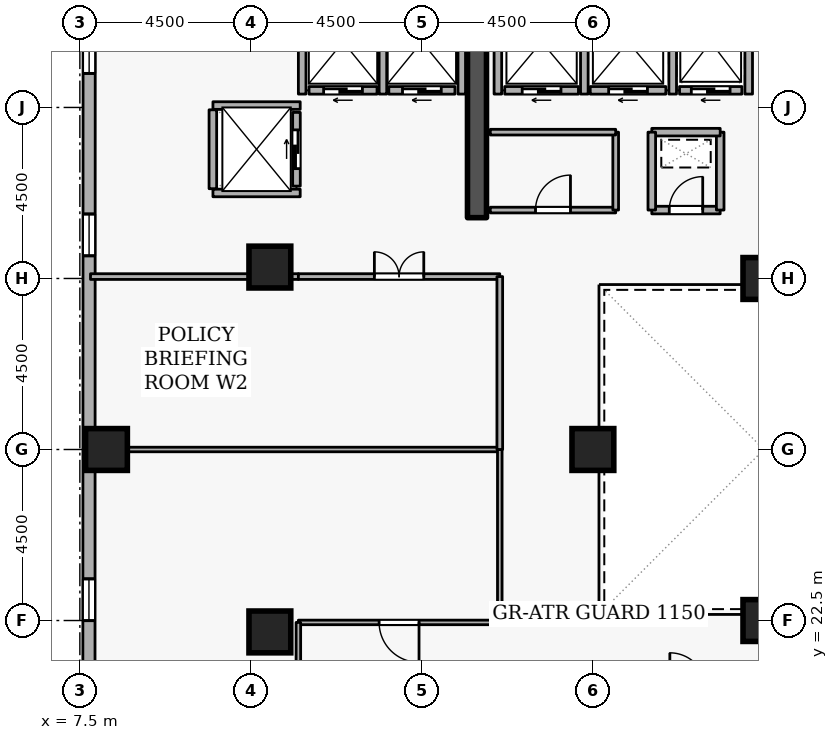
"""IFC4 building model, lengths in metres.
Left out: names, types, materials, properties, quantities, classifications, styles, units other than length and angle.
Written with IfcOpenShell. Run it as: python <this file> out.ifc"""

import sys

from ifc_helpers import new_model, si_unit, direction, frame, frame_2d, origin, origin_2d, place, context, subcontext, project, spatial, rectangle, extrude, element, fill, save


model = new_model("IFC4")
c1 = context("Model", 3, precision=1e-05, world=origin(), true_north=direction((0.0, 1.0)))
c2 = subcontext(c1, "Body", "Model", "MODEL_VIEW")
j1 = project(units=[si_unit("LENGTHUNIT", "METRE"), si_unit("PLANEANGLEUNIT", "RADIAN")], contexts=[c1])
p1 = place(None, origin())
s1 = spatial("IfcSite", under=j1, at=p1, CompositionType="ELEMENT")
p2 = place(p1, origin())
s2 = spatial("IfcBuilding", under=s1, at=p2, CompositionType="ELEMENT")
p3 = place(p2, frame((0.0, 0.0, 174.3)))
s3 = spatial("IfcBuildingStorey", under=s2, at=p3, CompositionType="ELEMENT", Elevation=174.3)
p4 = place(p3, frame((17.95, 33.1, 0.0), z_axis=(0.0, 0.0, 1.0), x_axis=(0.0, 1.0, 0.0)))
e1 = element("IfcWall", 1, at=p4, inside=s3, PredefinedType="SHEAR", context=c2, shape_type="SweptSolid", body=[
    extrude(rectangle(XDim=5.8, YDim=0.5, at=frame_2d((2.9, 0.0))), origin(), (0.0, 0.0, 1.0), 4.2),
])
for number, where, z_axis, x_axis in (
    (2, (8.2, 27.0, 0.0), (0.0, 0.0, 1.0), (1.0, 0.0, 0.0)),
    (3, (12.5, 22.2, 0.0), (0.0, 0.0, 1.0), (1.0, 0.0, 0.0)),
    (4, (12.5, 31.8, 0.0), (0.0, 0.0, 1.0), (1.0, 0.0, 0.0)),
    (5, (25.5, 22.5, 0.0), (0.0, 0.0, 1.0), (1.0, 0.0, 0.0)),
    (6, (25.5, 31.5, 0.0), (0.0, 0.0, 1.0), (1.0, 0.0, 0.0)),
    (7, (21.0, 27.0, 0.0), (0.0, 0.0, 1.0), (1.0, 0.0, 0.0)),
):
    element("IfcColumn", number, at=place(p3, frame(where, z_axis=z_axis, x_axis=x_axis)), inside=s3, PredefinedType="COLUMN", context=c2, shape_type="SweptSolid", body=[
        extrude(rectangle(XDim=1.1, YDim=1.1, at=origin_2d()), origin(), (0.0, 0.0, 1.0), 4.2),
    ])
p5 = place(p3, frame((7.747, 44.596, 0.0), z_axis=(0.0, 0.0, 1.0), x_axis=(-0.000364968916, -0.999999933399, 0.0)))
e8 = element("IfcWall", 8, at=p5, inside=s3, PredefinedType="STANDARD", context=c2, shape_type="SweptSolid", body=[
    extrude(rectangle(XDim=32.778, YDim=0.32, at=frame_2d((16.389, 0.0))), origin(), (0.0, 0.0, 1.0), 3.3),
])
p6 = place(p5, frame((1.8, 0.0, 0.72)))
e9 = element("IfcOpeningElement", 9, at=p6, cuts=e8, PredefinedType="OPENING", context=c2, shape_type="SweptSolid", body=[
    extrude(rectangle(XDim=1.1, YDim=1.8, at=frame_2d((0.55, 0.9))), frame((0.0, 0.17, 0.0), z_axis=(0.0, -1.0, 0.0), x_axis=(1.0, 0.0, 0.0)), (0.0, 0.0, 1.0), 0.34),
])
p7 = place(p5, frame((6.6, 0.0, 0.72)))
e10 = element("IfcOpeningElement", 10, at=p7, cuts=e8, PredefinedType="OPENING", context=c2, shape_type="SweptSolid", body=[
    extrude(rectangle(XDim=1.1, YDim=1.8, at=frame_2d((0.55, 0.9))), frame((0.0, 0.17, 0.0), z_axis=(0.0, -1.0, 0.0), x_axis=(1.0, 0.0, 0.0)), (0.0, 0.0, 1.0), 0.34),
])
p8 = place(p5, frame((11.4, 0.0, 0.72)))
e11 = element("IfcOpeningElement", 11, at=p8, cuts=e8, PredefinedType="OPENING", context=c2, shape_type="SweptSolid", body=[
    extrude(rectangle(XDim=1.1, YDim=1.8, at=frame_2d((0.55, 0.9))), frame((0.0, 0.17, 0.0), z_axis=(0.0, -1.0, 0.0), x_axis=(1.0, 0.0, 0.0)), (0.0, 0.0, 1.0), 0.34),
])
p9 = place(p5, frame((21.0, 0.0, 0.72)))
e12 = element("IfcOpeningElement", 12, at=p9, cuts=e8, PredefinedType="OPENING", context=c2, shape_type="SweptSolid", body=[
    extrude(rectangle(XDim=1.1, YDim=1.8, at=frame_2d((0.55, 0.9))), frame((0.0, 0.17, 0.0), z_axis=(0.0, -1.0, 0.0), x_axis=(1.0, 0.0, 0.0)), (0.0, 0.0, 1.0), 0.34),
])
p10 = place(p5, frame((25.8, 0.0, 0.72)))
e13 = element("IfcOpeningElement", 13, at=p10, cuts=e8, PredefinedType="OPENING", context=c2, shape_type="SweptSolid", body=[
    extrude(rectangle(XDim=1.1, YDim=1.8, at=frame_2d((0.55, 0.9))), frame((0.0, 0.17, 0.0), z_axis=(0.0, -1.0, 0.0), x_axis=(1.0, 0.0, 0.0)), (0.0, 0.0, 1.0), 0.34),
])
p11 = place(p3, frame((24.92, 36.45, 0.0), z_axis=(0.0, 0.0, 1.0), x_axis=(-1.0, 0.0, 0.0)))
e14 = element("IfcWall", 14, at=p11, inside=s3, PredefinedType="STANDARD", context=c2, shape_type="SweptSolid", body=[
    extrude(rectangle(XDim=1.64, YDim=0.2, at=frame_2d((0.82, 0.0))), origin(), (0.0, 0.0, 1.0), 3.94),
])
p12 = place(p11, frame((0.31, 0.0, 0.0)))
e15 = element("IfcOpeningElement", 15, at=p12, cuts=e14, PredefinedType="OPENING", context=c2, shape_type="SweptSolid", body=[
    extrude(rectangle(XDim=1.02, YDim=2.06, at=frame_2d((0.51, 1.03))), frame((0.0, 0.11, 0.0), z_axis=(0.0, -1.0, 0.0), x_axis=(1.0, 0.0, 0.0)), (0.0, 0.0, 1.0), 0.22),
])
p13 = place(p3, frame((22.92, 36.45, 0.0), z_axis=(0.0, 0.0, 1.0), x_axis=(-1.0, 0.0, 0.0)))
e16 = element("IfcWall", 16, at=p13, inside=s3, PredefinedType="STANDARD", context=c2, shape_type="SweptSolid", body=[
    extrude(rectangle(XDim=1.99, YDim=0.2, at=frame_2d((0.995, 0.0))), origin(), (0.0, 0.0, 1.0), 3.94),
])
p14 = place(p13, frame((0.485, 0.0, 0.0)))
e17 = element("IfcOpeningElement", 17, at=p14, cuts=e16, PredefinedType="OPENING", context=c2, shape_type="SweptSolid", body=[
    extrude(rectangle(XDim=1.02, YDim=2.06, at=frame_2d((0.51, 1.03))), frame((0.0, 0.11, 0.0), z_axis=(0.0, -1.0, 0.0), x_axis=(1.0, 0.0, 0.0)), (0.0, 0.0, 1.0), 0.22),
])
p15 = place(p3, frame((20.62, 36.45, 0.0), z_axis=(0.0, 0.0, 1.0), x_axis=(-1.0, 0.0, 0.0)))
e18 = element("IfcWall", 18, at=p15, inside=s3, PredefinedType="STANDARD", context=c2, shape_type="SweptSolid", body=[
    extrude(rectangle(XDim=1.94, YDim=0.2, at=frame_2d((0.97, 0.0))), origin(), (0.0, 0.0, 1.0), 3.94),
])
p16 = place(p15, frame((0.46, 0.0, 0.0)))
e19 = element("IfcOpeningElement", 19, at=p16, cuts=e18, PredefinedType="OPENING", context=c2, shape_type="SweptSolid", body=[
    extrude(rectangle(XDim=1.02, YDim=2.06, at=frame_2d((0.51, 1.03))), frame((0.0, 0.11, 0.0), z_axis=(0.0, -1.0, 0.0), x_axis=(1.0, 0.0, 0.0)), (0.0, 0.0, 1.0), 0.22),
])
p17 = place(p3, frame((17.37, 36.45, 0.0), z_axis=(0.0, 0.0, 1.0), x_axis=(-1.0, 0.0, 0.0)))
e20 = element("IfcWall", 20, at=p17, inside=s3, PredefinedType="STANDARD", context=c2, shape_type="SweptSolid", body=[
    extrude(rectangle(XDim=1.74, YDim=0.2, at=frame_2d((0.87, 0.0))), origin(), (0.0, 0.0, 1.0), 3.94),
])
p18 = place(p17, frame((0.36, 0.0, 0.0)))
e21 = element("IfcOpeningElement", 21, at=p18, cuts=e20, PredefinedType="OPENING", context=c2, shape_type="SweptSolid", body=[
    extrude(rectangle(XDim=1.02, YDim=2.06, at=frame_2d((0.51, 1.03))), frame((0.0, 0.11, 0.0), z_axis=(0.0, -1.0, 0.0), x_axis=(1.0, 0.0, 0.0)), (0.0, 0.0, 1.0), 0.22),
])
p19 = place(p3, frame((15.32, 36.45, 0.0), z_axis=(0.0, 0.0, 1.0), x_axis=(-1.0, 0.0, 0.0)))
e22 = element("IfcWall", 22, at=p19, inside=s3, PredefinedType="STANDARD", context=c2, shape_type="SweptSolid", body=[
    extrude(rectangle(XDim=1.79, YDim=0.2, at=frame_2d((0.895, 0.0))), origin(), (0.0, 0.0, 1.0), 3.94),
])
p20 = place(p19, frame((0.385, 0.0, 0.0)))
e23 = element("IfcOpeningElement", 23, at=p20, cuts=e22, PredefinedType="OPENING", context=c2, shape_type="SweptSolid", body=[
    extrude(rectangle(XDim=1.02, YDim=2.06, at=frame_2d((0.51, 1.03))), frame((0.0, 0.11, 0.0), z_axis=(0.0, -1.0, 0.0), x_axis=(1.0, 0.0, 0.0)), (0.0, 0.0, 1.0), 0.22),
])
p21 = place(p3, frame((13.2, 33.93, 0.0), z_axis=(0.0, 0.0, 1.0), x_axis=(0.0, 1.0, 0.0)))
e24 = element("IfcWall", 24, at=p21, inside=s3, PredefinedType="STANDARD", context=c2, shape_type="SweptSolid", body=[
    extrude(rectangle(XDim=1.94, YDim=0.2, at=frame_2d((0.97, 0.0))), origin(), (0.0, 0.0, 1.0), 3.94),
])
p22 = place(p21, frame((0.46, 0.0, 0.0)))
e25 = element("IfcOpeningElement", 25, at=p22, cuts=e24, PredefinedType="OPENING", context=c2, shape_type="SweptSolid", body=[
    extrude(rectangle(XDim=1.02, YDim=2.06, at=frame_2d((0.51, 1.03))), frame((0.0, 0.11, 0.0), z_axis=(0.0, -1.0, 0.0), x_axis=(1.0, 0.0, 0.0)), (0.0, 0.0, 1.0), 0.22),
])
for number, where, z_axis, x_axis in (
    (26, (25.1, 36.352, 0.0), (0.0, 0.0, 1.0), (0.0, 1.0, 0.0)),
    (27, (23.1, 36.352, 0.0), (0.0, 0.0, 1.0), (0.0, 1.0, 0.0)),
    (28, (20.775, 36.352, 0.0), (0.0, 0.0, 1.0), (0.0, 1.0, 0.0)),
    (29, (18.5, 36.352, 0.0), (0.0, 0.0, 1.0), (0.0, 1.0, 0.0)),
):
    element("IfcWall", number, at=place(p3, frame(where, z_axis=z_axis, x_axis=x_axis)), inside=s3, PredefinedType="STANDARD", context=c2, shape_type="SweptSolid", body=[
        extrude(rectangle(XDim=2.536, YDim=0.2, at=frame_2d((1.268, 0.0))), origin(), (0.0, 0.0, 1.0), 3.94),
    ])
p23 = place(p3, frame((17.55, 36.352, 0.0), z_axis=(0.0, 0.0, 1.0), x_axis=(0.0, 1.0, 0.0)))
e30 = element("IfcWall", 30, at=p23, inside=s3, PredefinedType="STANDARD", context=c2, shape_type="SweptSolid", body=[
    extrude(rectangle(XDim=2.636, YDim=0.2, at=frame_2d((1.318, 0.0))), origin(), (0.0, 0.0, 1.0), 3.145),
])
for number, where, z_axis, x_axis in (
    (31, (15.475, 36.352, 0.0), (0.0, 0.0, 1.0), (0.0, 1.0, 0.0)),
    (32, (13.35, 36.352, 0.0), (0.0, 0.0, 1.0), (0.0, 1.0, 0.0)),
):
    element("IfcWall", number, at=place(p3, frame(where, z_axis=z_axis, x_axis=x_axis)), inside=s3, PredefinedType="STANDARD", context=c2, shape_type="SweptSolid", body=[
        extrude(rectangle(XDim=2.636, YDim=0.2, at=frame_2d((1.318, 0.0))), origin(), (0.0, 0.0, 1.0), 3.94),
    ])
for number, where, z_axis, x_axis in (
    (33, (11.002, 36.05, 0.0), (0.0, 0.0, 1.0), (1.0, 0.0, 0.0)),
    (34, (11.002, 33.75, 0.0), (0.0, 0.0, 1.0), (1.0, 0.0, 0.0)),
):
    element("IfcWall", number, at=place(p3, frame(where, z_axis=z_axis, x_axis=x_axis)), inside=s3, PredefinedType="STANDARD", context=c2, shape_type="SweptSolid", body=[
        extrude(rectangle(XDim=2.296, YDim=0.2, at=frame_2d((1.148, 0.0))), origin(), (0.0, 0.0, 1.0), 3.94),
    ])
p24 = place(p3, frame((11.0, 33.862, 0.0), z_axis=(0.0, 0.0, 1.0), x_axis=(0.0, 1.0, 0.0)))
e35 = element("IfcWall", 35, at=p24, inside=s3, PredefinedType="STANDARD", context=c2, shape_type="SweptSolid", body=[
    extrude(rectangle(XDim=2.076, YDim=0.2, at=frame_2d((1.038, 0.0))), origin(), (0.0, 0.0, 1.0), 3.94),
])
p25 = place(p3, frame((22.55, 33.3, 0.0), z_axis=(0.0, 0.0, 1.0), x_axis=(1.0, 0.0, 0.0)))
e36 = element("IfcWall", 36, at=p25, inside=s3, PredefinedType="STANDARD", context=c2, shape_type="SweptSolid", body=[
    extrude(rectangle(XDim=1.8, YDim=0.2, at=frame_2d((0.9, 0.0))), origin(), (0.0, 0.0, 1.0), 3.94),
])
p26 = place(p25, frame((0.46, 0.0, 0.0)))
e37 = element("IfcOpeningElement", 37, at=p26, cuts=e36, PredefinedType="OPENING", context=c2, shape_type="SweptSolid", body=[
    extrude(rectangle(XDim=0.88, YDim=2.04, at=frame_2d((0.44, 1.02))), frame((0.0, 0.11, 0.0), z_axis=(0.0, -1.0, 0.0), x_axis=(1.0, 0.0, 0.0)), (0.0, 0.0, 1.0), 0.22),
])
p27 = place(p3, frame((24.35, 33.3, 0.0), z_axis=(0.0, 0.0, 1.0), x_axis=(0.0, 1.0, 0.0)))
e38 = element("IfcWall", 38, at=p27, inside=s3, PredefinedType="STANDARD", context=c2, shape_type="SweptSolid", body=[
    extrude(rectangle(XDim=2.05, YDim=0.2, at=frame_2d((1.025, 0.0))), origin(), (0.0, 0.0, 1.0), 3.94),
])
p28 = place(p3, frame((24.35, 35.35, 0.0), z_axis=(0.0, 0.0, 1.0), x_axis=(-1.0, 0.0, 0.0)))
e39 = element("IfcWall", 39, at=p28, inside=s3, PredefinedType="STANDARD", context=c2, shape_type="SweptSolid", body=[
    extrude(rectangle(XDim=1.8, YDim=0.2, at=frame_2d((0.9, 0.0))), origin(), (0.0, 0.0, 1.0), 3.94),
])
p29 = place(p3, frame((22.55, 35.35, 0.0), z_axis=(0.0, 0.0, 1.0), x_axis=(0.0, -1.0, 0.0)))
e40 = element("IfcWall", 40, at=p29, inside=s3, PredefinedType="STANDARD", context=c2, shape_type="SweptSolid", body=[
    extrude(rectangle(XDim=2.05, YDim=0.2, at=frame_2d((1.025, 0.0))), origin(), (0.0, 0.0, 1.0), 3.94),
])
p30 = place(p3, frame((18.3, 33.3, 0.0), z_axis=(0.0, 0.0, 1.0), x_axis=(1.0, 0.0, 0.0)))
e41 = element("IfcWall", 41, at=p30, inside=s3, PredefinedType="PARTITIONING", context=c2, shape_type="SweptSolid", body=[
    extrude(rectangle(XDim=3.3, YDim=0.15, at=frame_2d((1.65, 0.0))), origin(), (0.0, 0.0, 1.0), 3.94),
])
p31 = place(p30, frame((1.19, 0.0, 0.0)))
e42 = element("IfcOpeningElement", 42, at=p31, cuts=e41, PredefinedType="OPENING", context=c2, shape_type="SweptSolid", body=[
    extrude(rectangle(XDim=0.92, YDim=2.08, at=frame_2d((0.46, 1.04))), frame((0.0, 0.085, 0.0), z_axis=(0.0, -1.0, 0.0), x_axis=(1.0, 0.0, 0.0)), (0.0, 0.0, 1.0), 0.17),
])
p32 = place(p3, frame((21.6, 33.3, 0.0), z_axis=(0.0, 0.0, 1.0), x_axis=(0.0, 1.0, 0.0)))
e43 = element("IfcWall", 43, at=p32, inside=s3, PredefinedType="PARTITIONING", context=c2, shape_type="SweptSolid", body=[
    extrude(rectangle(XDim=2.05, YDim=0.15, at=frame_2d((1.025, 0.0))), origin(), (0.0, 0.0, 1.0), 3.94),
])
p33 = place(p3, frame((21.6, 35.35, 0.0), z_axis=(0.0, 0.0, 1.0), x_axis=(-1.0, 0.0, 0.0)))
e44 = element("IfcWall", 44, at=p33, inside=s3, PredefinedType="PARTITIONING", context=c2, shape_type="SweptSolid", body=[
    extrude(rectangle(XDim=3.3, YDim=0.15, at=frame_2d((1.65, 0.0))), origin(), (0.0, 0.0, 1.0), 3.94),
])
p34 = place(p3, frame((7.78, 27.0, 0.0), z_axis=(0.0, 0.0, 1.0), x_axis=(1.0, 0.0, 0.0)))
e45 = element("IfcWall", 45, at=p34, inside=s3, PredefinedType="PARTITIONING", context=c2, shape_type="SweptSolid", body=[
    extrude(rectangle(XDim=10.77, YDim=0.12, at=frame_2d((5.385, 0.0))), origin(), (0.0, 0.0, 1.0), 3.532),
])
p35 = place(p3, frame((18.55, 27.0, 0.0), z_axis=(0.0, 0.0, 1.0), x_axis=(0.0, -1.0, 0.0)))
e46 = element("IfcWall", 46, at=p35, inside=s3, PredefinedType="PARTITIONING", context=c2, shape_type="SweptSolid", body=[
    extrude(rectangle(XDim=4.55, YDim=0.12, at=frame_2d((2.275, 0.0))), origin(), (0.0, 0.0, 1.0), 3.94),
])
p36 = place(p3, frame((18.55, 22.45, 0.0), z_axis=(0.0, 0.0, 1.0), x_axis=(-1.0, 0.0, 0.0)))
e47 = element("IfcWall", 47, at=p36, inside=s3, PredefinedType="PARTITIONING", context=c2, shape_type="SweptSolid", body=[
    extrude(rectangle(XDim=5.3, YDim=0.12, at=frame_2d((2.65, 0.0))), origin(), (0.0, 0.0, 1.0), 3.94),
])
p37 = place(p36, frame((2.125, 0.0, 0.0)))
e48 = element("IfcOpeningElement", 48, at=p37, cuts=e47, PredefinedType="OPENING", context=c2, shape_type="SweptSolid", body=[
    extrude(rectangle(XDim=1.05, YDim=2.1, at=frame_2d((0.525, 1.05))), frame((0.0, 0.07, 0.0), z_axis=(0.0, -1.0, 0.0), x_axis=(1.0, 0.0, 0.0)), (0.0, 0.0, 1.0), 0.14),
])
p38 = place(p3, frame((13.25, 22.45, 0.0), z_axis=(0.0, 0.0, 1.0), x_axis=(0.0, -1.0, 0.0)))
e49 = element("IfcWall", 49, at=p38, inside=s3, PredefinedType="PARTITIONING", context=c2, shape_type="SweptSolid", body=[
    extrude(rectangle(XDim=1.75, YDim=0.12, at=frame_2d((0.875, 0.0))), origin(), (0.0, 0.0, 1.0), 3.94),
])
p39 = place(p3, frame((7.78, 31.55, 0.0), z_axis=(0.0, 0.0, 1.0), x_axis=(1.0, 0.0, 0.0)))
e50 = element("IfcWall", 50, at=p39, inside=s3, PredefinedType="PARTITIONING", context=c2, shape_type="SweptSolid", body=[
    extrude(rectangle(XDim=5.47, YDim=0.15, at=frame_2d((2.735, 0.0))), origin(), (0.0, 0.0, 1.0), 3.94),
])
p40 = place(p3, frame((13.25, 31.55, 0.0), z_axis=(0.0, 0.0, 1.0), x_axis=(1.0, 0.0, 0.0)))
e51 = element("IfcWall", 51, at=p40, inside=s3, PredefinedType="PARTITIONING", context=c2, shape_type="SweptSolid", body=[
    extrude(rectangle(XDim=5.3, YDim=0.15, at=frame_2d((2.65, 0.0))), origin(), (0.0, 0.0, 1.0), 3.94),
])
p41 = place(p40, frame((2.0, 0.0, 0.0)))
e52 = element("IfcOpeningElement", 52, at=p41, cuts=e51, PredefinedType="OPENING", context=c2, shape_type="SweptSolid", body=[
    extrude(rectangle(XDim=1.3, YDim=2.12, at=frame_2d((0.65, 1.06))), frame((0.0, 0.085, 0.0), z_axis=(0.0, -1.0, 0.0), x_axis=(1.0, 0.0, 0.0)), (0.0, 0.0, 1.0), 0.17),
])
p42 = place(p3, frame((18.55, 31.55, 0.0), z_axis=(0.0, 0.0, 1.0), x_axis=(0.0, -1.0, 0.0)))
e53 = element("IfcWall", 53, at=p42, inside=s3, PredefinedType="PARTITIONING", context=c2, shape_type="SweptSolid", body=[
    extrude(rectangle(XDim=4.55, YDim=0.15, at=frame_2d((2.275, 0.0))), origin(), (0.0, 0.0, 1.0), 3.94),
])
p43 = place(p7, origin())
e54 = element("IfcWindow", 54, at=p43, inside=s3, PartitioningType="SINGLE_PANEL", PredefinedType="WINDOW", context=c2, shape_type="SweptSolid", body=[
    extrude(rectangle(XDim=1.1, YDim=1.8, at=frame_2d((0.55, 0.9))), frame((0.0, 0.03, 0.0), z_axis=(0.0, -1.0, 0.0), x_axis=(1.0, 0.0, 0.0)), (0.0, 0.0, 1.0), 0.06),
])
fill(e10, e54)
p44 = place(p8, origin())
e55 = element("IfcWindow", 55, at=p44, inside=s3, PartitioningType="SINGLE_PANEL", PredefinedType="WINDOW", context=c2, shape_type="SweptSolid", body=[
    extrude(rectangle(XDim=1.1, YDim=1.8, at=frame_2d((0.55, 0.9))), frame((0.0, 0.03, 0.0), z_axis=(0.0, -1.0, 0.0), x_axis=(1.0, 0.0, 0.0)), (0.0, 0.0, 1.0), 0.06),
])
fill(e11, e55)
p45 = place(p9, origin())
e56 = element("IfcWindow", 56, at=p45, inside=s3, PartitioningType="SINGLE_PANEL", PredefinedType="WINDOW", context=c2, shape_type="SweptSolid", body=[
    extrude(rectangle(XDim=1.1, YDim=1.8, at=frame_2d((0.55, 0.9))), frame((0.0, 0.03, 0.0), z_axis=(0.0, -1.0, 0.0), x_axis=(1.0, 0.0, 0.0)), (0.0, 0.0, 1.0), 0.06),
])
fill(e12, e56)
p46 = place(p12, origin())
e57 = element("IfcDoor", 57, at=p46, inside=s3, OperationType="SLIDING_TO_LEFT", PredefinedType="DOOR", context=c2, shape_type="SweptSolid", body=[
    extrude(rectangle(XDim=1.02, YDim=2.06, at=frame_2d((0.51, 1.03))), frame((0.0, 0.025, 0.0), z_axis=(0.0, -1.0, 0.0), x_axis=(1.0, 0.0, 0.0)), (0.0, 0.0, 1.0), 0.05),
])
fill(e15, e57)
p47 = place(p14, origin())
e58 = element("IfcDoor", 58, at=p47, inside=s3, OperationType="SLIDING_TO_LEFT", PredefinedType="DOOR", context=c2, shape_type="SweptSolid", body=[
    extrude(rectangle(XDim=1.02, YDim=2.06, at=frame_2d((0.51, 1.03))), frame((0.0, 0.025, 0.0), z_axis=(0.0, -1.0, 0.0), x_axis=(1.0, 0.0, 0.0)), (0.0, 0.0, 1.0), 0.05),
])
fill(e17, e58)
p48 = place(p16, origin())
e59 = element("IfcDoor", 59, at=p48, inside=s3, OperationType="SLIDING_TO_LEFT", PredefinedType="DOOR", context=c2, shape_type="SweptSolid", body=[
    extrude(rectangle(XDim=1.02, YDim=2.06, at=frame_2d((0.51, 1.03))), frame((0.0, 0.025, 0.0), z_axis=(0.0, -1.0, 0.0), x_axis=(1.0, 0.0, 0.0)), (0.0, 0.0, 1.0), 0.05),
])
fill(e19, e59)
p49 = place(p18, origin())
e60 = element("IfcDoor", 60, at=p49, inside=s3, OperationType="SLIDING_TO_LEFT", PredefinedType="DOOR", context=c2, shape_type="SweptSolid", body=[
    extrude(rectangle(XDim=1.02, YDim=2.06, at=frame_2d((0.51, 1.03))), frame((0.0, 0.025, 0.0), z_axis=(0.0, -1.0, 0.0), x_axis=(1.0, 0.0, 0.0)), (0.0, 0.0, 1.0), 0.05),
])
fill(e21, e60)
p50 = place(p20, origin())
e61 = element("IfcDoor", 61, at=p50, inside=s3, OperationType="SLIDING_TO_LEFT", PredefinedType="DOOR", context=c2, shape_type="SweptSolid", body=[
    extrude(rectangle(XDim=1.02, YDim=2.06, at=frame_2d((0.51, 1.03))), frame((0.0, 0.025, 0.0), z_axis=(0.0, -1.0, 0.0), x_axis=(1.0, 0.0, 0.0)), (0.0, 0.0, 1.0), 0.05),
])
fill(e23, e61)
p51 = place(p22, origin())
e62 = element("IfcDoor", 62, at=p51, inside=s3, OperationType="SLIDING_TO_LEFT", PredefinedType="DOOR", context=c2, shape_type="SweptSolid", body=[
    extrude(rectangle(XDim=1.02, YDim=2.06, at=frame_2d((0.51, 1.03))), frame((0.0, 0.025, 0.0), z_axis=(0.0, -1.0, 0.0), x_axis=(1.0, 0.0, 0.0)), (0.0, 0.0, 1.0), 0.05),
])
fill(e25, e62)
p52 = place(p26, origin())
e63 = element("IfcDoor", 63, at=p52, inside=s3, OperationType="SINGLE_SWING_RIGHT", PredefinedType="DOOR", context=c2, shape_type="SweptSolid", body=[
    extrude(rectangle(XDim=0.88, YDim=2.04, at=frame_2d((0.44, 1.02))), frame((0.0, 0.025, 0.0), z_axis=(0.0, -1.0, 0.0), x_axis=(1.0, 0.0, 0.0)), (0.0, 0.0, 1.0), 0.05),
])
fill(e37, e63)
p53 = place(p31, origin())
e64 = element("IfcDoor", 64, at=p53, inside=s3, OperationType="SINGLE_SWING_RIGHT", PredefinedType="DOOR", context=c2, shape_type="SweptSolid", body=[
    extrude(rectangle(XDim=0.92, YDim=2.08, at=frame_2d((0.46, 1.04))), frame((0.0, 0.025, 0.0), z_axis=(0.0, -1.0, 0.0), x_axis=(1.0, 0.0, 0.0)), (0.0, 0.0, 1.0), 0.05),
])
fill(e42, e64)
p54 = place(p37, origin())
e65 = element("IfcDoor", 65, at=p54, inside=s3, OperationType="SINGLE_SWING_LEFT", PredefinedType="DOOR", context=c2, shape_type="SweptSolid", body=[
    extrude(rectangle(XDim=1.05, YDim=2.1, at=frame_2d((0.525, 1.05))), frame((0.0, 0.025, 0.0), z_axis=(0.0, -1.0, 0.0), x_axis=(1.0, 0.0, 0.0)), (0.0, 0.0, 1.0), 0.05),
])
fill(e48, e65)
p55 = place(p41, origin())
e66 = element("IfcDoor", 66, at=p55, inside=s3, OperationType="DOUBLE_DOOR_SINGLE_SWING", PredefinedType="DOOR", context=c2, shape_type="SweptSolid", body=[
    extrude(rectangle(XDim=1.3, YDim=2.12, at=frame_2d((0.65, 1.06))), frame((0.0, 0.025, 0.0), z_axis=(0.0, -1.0, 0.0), x_axis=(1.0, 0.0, 0.0)), (0.0, 0.0, 1.0), 0.05),
])
fill(e52, e66)
save(model, sys.argv[1])
